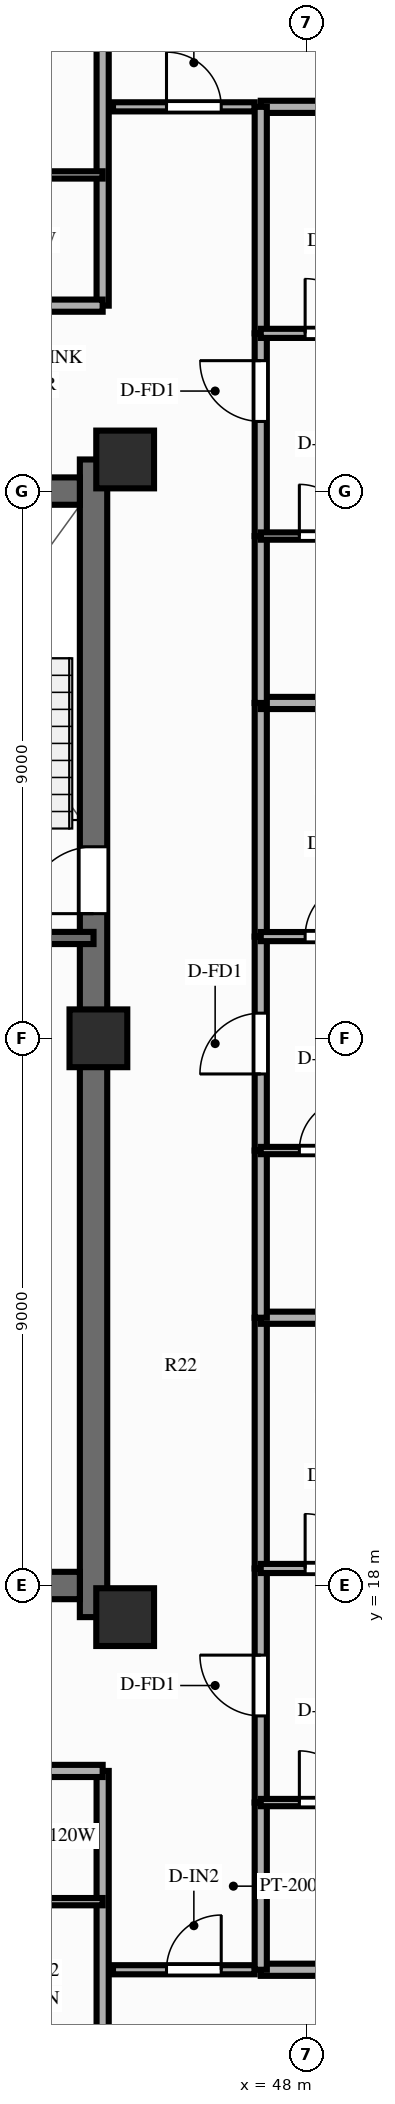
"""IFC4 building model, lengths in metres.
Left out: names, types, materials, properties, quantities, classifications, styles, units other than length and angle.
Written with IfcOpenShell. Run it as: python <this file> out.ifc"""

import sys

from ifc_helpers import new_model, si_unit, direction, frame, frame_2d, origin, origin_2d, place, context, subcontext, project, spatial, rectangle, extrude, source, transform, mapped, element, fill, save


model = new_model("IFC4")
c1 = context("Model", 3, precision=1e-05, world=origin(), true_north=direction((0.0, 1.0)))
c2 = subcontext(c1, "Body", "Model", "MODEL_VIEW")
j1 = project(units=[si_unit("LENGTHUNIT", "METRE"), si_unit("PLANEANGLEUNIT", "RADIAN")], contexts=[c1])
p1 = place(None, origin())
s1 = spatial("IfcSite", under=j1, at=p1, CompositionType="ELEMENT")
p2 = place(p1, origin())
s2 = spatial("IfcBuilding", under=s1, at=p2, CompositionType="ELEMENT")
p3 = place(p2, frame((0.0, 0.0, 226.2)))
s3 = spatial("IfcBuildingStorey", under=s2, at=p3, CompositionType="ELEMENT", Elevation=226.2)
p4 = place(p3, frame((44.5, 17.48, 0.0), z_axis=(0.0, 0.0, 1.0), x_axis=(0.0, 1.0, 0.0)))
e1 = element("IfcWall", 1, at=p4, inside=s3, PredefinedType="SHEAR", context=c2, shape_type="SweptSolid", body=[
    extrude(rectangle(XDim=19.04, YDim=0.45, at=frame_2d((9.52, 0.0))), origin(), (0.0, 0.0, 1.0), 3.9),
])
p5 = place(p4, frame((12.67, 0.0, 0.0), z_axis=(0.0, 0.0, 1.0), x_axis=(-1.0, 0.0, 0.0)))
e2 = element("IfcOpeningElement", 2, at=p5, cuts=e1, PredefinedType="OPENING", context=c2, shape_type="SweptSolid", body=[
    extrude(rectangle(XDim=1.1, YDim=2.15, at=frame_2d((0.55, 1.075))), frame((0.0, 0.237, 0.0), z_axis=(0.0, -1.0, 0.0), x_axis=(1.0, 0.0, 0.0)), (0.0, 0.0, 1.0), 0.474),
])
p6 = place(p3, frame((31.725, 18.0, 0.0), z_axis=(0.0, 0.0, 1.0), x_axis=(1.0, 0.0, 0.0)))
e3 = element("IfcWall", 3, at=p6, inside=s3, PredefinedType="SHEAR", context=c2, shape_type="SweptSolid", body=[
    extrude(rectangle(XDim=12.55, YDim=0.45, at=frame_2d((6.275, 0.0))), origin(), (0.0, 0.0, 1.0), 3.9),
])
p7 = place(p3, frame((31.725, 36.0, 0.0), z_axis=(0.0, 0.0, 1.0), x_axis=(1.0, 0.0, 0.0)))
e4 = element("IfcWall", 4, at=p7, inside=s3, PredefinedType="SHEAR", context=c2, shape_type="SweptSolid", body=[
    extrude(rectangle(XDim=12.55, YDim=0.45, at=frame_2d((6.275, 0.0))), origin(), (0.0, 0.0, 1.0), 3.9),
])
p8 = place(p7, frame((5.225, 0.0, 0.0), z_axis=(0.0, 0.0, 1.0), x_axis=(-1.0, 0.0, 0.0)))
e5 = element("IfcOpeningElement", 5, at=p8, cuts=e4, PredefinedType="OPENING", context=c2, shape_type="SweptSolid", body=[
    extrude(rectangle(XDim=1.4, YDim=2.15, at=frame_2d((0.7, 1.075))), frame((0.0, 0.237, 0.0), z_axis=(0.0, -1.0, 0.0), x_axis=(1.0, 0.0, 0.0)), (0.0, 0.0, 1.0), 0.474),
])
m1 = source(origin(), c2, "Body", "SweptSolid", [
    extrude(rectangle(XDim=0.95, YDim=0.95, at=origin_2d()), origin(), (0.0, 0.0, 1.0), 3.9),
])
for number, where, z_axis, x_axis in (
    (6, (45.02, 17.48, 0.0), (0.0, 0.0, 1.0), (1.0, 0.0, 0.0)),
    (7, (45.02, 36.52, 0.0), (0.0, 0.0, 1.0), (1.0, 0.0, 0.0)),
    (8, (44.58, 27.0, 0.0), (0.0, 0.0, 1.0), (1.0, 0.0, 0.0)),
):
    element("IfcColumn", number, at=place(p3, frame(where, z_axis=z_axis, x_axis=x_axis)), inside=s3, PredefinedType="COLUMN", context=c2, shape_type="MappedRepresentation", body=[
        mapped(m1, transform((0.0, 0.0, 0.0), scale=1.0)),
    ])
p9 = place(p3, frame((40.57, 28.65, 0.0), z_axis=(0.0, 0.0, 1.0), x_axis=(1.0, 0.0, 0.0)))
e9 = element("IfcWall", 9, at=p9, inside=s3, PredefinedType="SOLIDWALL", context=c2, shape_type="SweptSolid", body=[
    extrude(rectangle(XDim=3.93, YDim=0.2, at=frame_2d((1.965, 0.0))), origin(), (0.0, 0.0, 1.0), 3.69),
])
p10 = place(p3, frame((44.82, 11.68, 0.0), z_axis=(0.0, 0.0, 1.0), x_axis=(1.0, 0.0, 0.0)))
e10 = element("IfcWall", 10, at=p10, inside=s3, PredefinedType="PARTITIONING", context=c2, shape_type="SweptSolid", body=[
    extrude(rectangle(XDim=2.33, YDim=0.15, at=frame_2d((1.165, 0.0))), origin(), (0.0, 0.0, 1.0), 3.69),
])
p11 = place(p10, frame((0.88, 0.0, 0.0)))
e11 = element("IfcOpeningElement", 11, at=p11, cuts=e10, PredefinedType="OPENING", context=c2, shape_type="SweptSolid", body=[
    extrude(rectangle(XDim=0.9, YDim=2.1, at=frame_2d((0.45, 1.05))), frame((0.0, 0.087, 0.0), z_axis=(0.0, -1.0, 0.0), x_axis=(1.0, 0.0, 0.0)), (0.0, 0.0, 1.0), 0.174),
])
p12 = place(p3, frame((44.82, 42.32, 0.0), z_axis=(0.0, 0.0, 1.0), x_axis=(1.0, 0.0, 0.0)))
e12 = element("IfcWall", 12, at=p12, inside=s3, PredefinedType="PARTITIONING", context=c2, shape_type="SweptSolid", body=[
    extrude(rectangle(XDim=2.33, YDim=0.15, at=frame_2d((1.165, 0.0))), origin(), (0.0, 0.0, 1.0), 3.69),
])
p13 = place(p12, frame((0.88, 0.0, 0.0)))
e13 = element("IfcOpeningElement", 13, at=p13, cuts=e12, PredefinedType="OPENING", context=c2, shape_type="SweptSolid", body=[
    extrude(rectangle(XDim=0.9, YDim=2.1, at=frame_2d((0.45, 1.05))), frame((0.0, 0.087, 0.0), z_axis=(0.0, -1.0, 0.0), x_axis=(1.0, 0.0, 0.0)), (0.0, 0.0, 1.0), 0.174),
])
p14 = place(p3, frame((44.65, 14.95, 0.0), z_axis=(0.0, 0.0, 1.0), x_axis=(0.0, -1.0, 0.0)))
e14 = element("IfcWall", 14, at=p14, inside=s3, PredefinedType="PARTITIONING", context=c2, shape_type="SweptSolid", body=[
    extrude(rectangle(XDim=8.8, YDim=0.2, at=frame_2d((4.4, 0.0))), origin(), (0.0, 0.0, 1.0), 2.79),
])
p15 = place(p3, frame((41.8, 14.95, 0.0), z_axis=(0.0, 0.0, 1.0), x_axis=(1.0, 0.0, 0.0)))
e15 = element("IfcWall", 15, at=p15, inside=s3, PredefinedType="PARTITIONING", context=c2, shape_type="SweptSolid", body=[
    extrude(rectangle(XDim=2.85, YDim=0.2, at=frame_2d((1.425, 0.0))), origin(), (0.0, 0.0, 1.0), 3.69),
])
p16 = place(p3, frame((41.8, 12.8, 0.0), z_axis=(0.0, 0.0, 1.0), x_axis=(1.0, 0.0, 0.0)))
e16 = element("IfcWall", 16, at=p16, inside=s3, PredefinedType="PARTITIONING", context=c2, shape_type="SweptSolid", body=[
    extrude(rectangle(XDim=2.85, YDim=0.12, at=frame_2d((1.425, 0.0))), origin(), (0.0, 0.0, 1.0), 3.69),
])
p17 = place(p3, frame((44.65, 39.05, 0.0), z_axis=(0.0, 0.0, 1.0), x_axis=(0.0, 1.0, 0.0)))
e17 = element("IfcWall", 17, at=p17, inside=s3, PredefinedType="PARTITIONING", context=c2, shape_type="SweptSolid", body=[
    extrude(rectangle(XDim=8.8, YDim=0.2, at=frame_2d((4.4, 0.0))), origin(), (0.0, 0.0, 1.0), 2.79),
])
p18 = place(p3, frame((41.983, 39.05, 0.0), z_axis=(0.0, 0.0, 1.0), x_axis=(1.0, 0.0, 0.0)))
e18 = element("IfcWall", 18, at=p18, inside=s3, PredefinedType="PARTITIONING", context=c2, shape_type="SweptSolid", body=[
    extrude(rectangle(XDim=2.667, YDim=0.2, at=frame_2d((1.333, 0.0))), origin(), (0.0, 0.0, 1.0), 3.69),
])
p19 = place(p3, frame((41.983, 41.2, 0.0), z_axis=(0.0, 0.0, 1.0), x_axis=(1.0, 0.0, 0.0)))
e19 = element("IfcWall", 19, at=p19, inside=s3, PredefinedType="PARTITIONING", context=c2, shape_type="SweptSolid", body=[
    extrude(rectangle(XDim=2.667, YDim=0.12, at=frame_2d((1.333, 0.0))), origin(), (0.0, 0.0, 1.0), 3.69),
])
for number, where, z_axis, x_axis in (
    (20, (47.25, 11.68, 0.0), (0.0, 0.0, 1.0), (1.0, 0.0, 0.0)),
    (21, (47.25, 42.32, 0.0), (0.0, 0.0, 1.0), (1.0, 0.0, 0.0)),
):
    element("IfcWall", number, at=place(p3, frame(where, z_axis=z_axis, x_axis=x_axis)), inside=s3, PredefinedType="PARTITIONING", context=c2, shape_type="SweptSolid", body=[
        extrude(rectangle(XDim=7.35, YDim=0.2, at=frame_2d((3.675, 0.0))), origin(), (0.0, 0.0, 1.0), 3.69),
    ])
p20 = place(p3, frame((47.25, 11.68, 0.0), z_axis=(0.0, 0.0, 1.0), x_axis=(0.0, 1.0, 0.0)))
e22 = element("IfcWall", 22, at=p20, inside=s3, PredefinedType="PARTITIONING", context=c2, shape_type="SweptSolid", body=[
    extrude(rectangle(XDim=2.75, YDim=0.2, at=frame_2d((1.375, 0.0))), origin(), (0.0, 0.0, 1.0), 3.69),
])
p21 = place(p3, frame((47.25, 14.43, 0.0), z_axis=(0.0, 0.0, 1.0), x_axis=(0.0, 1.0, 0.0)))
e23 = element("IfcWall", 23, at=p21, inside=s3, PredefinedType="PARTITIONING", context=c2, shape_type="SweptSolid", body=[
    extrude(rectangle(XDim=3.85, YDim=0.2, at=frame_2d((1.925, 0.0))), origin(), (0.0, 0.0, 1.0), 3.69),
])
p22 = place(p21, frame((1.425, 0.0, 0.0)))
e24 = element("IfcOpeningElement", 24, at=p22, cuts=e23, PredefinedType="OPENING", context=c2, shape_type="SweptSolid", body=[
    extrude(rectangle(XDim=1.0, YDim=2.15, at=frame_2d((0.5, 1.075))), frame((0.0, 0.112, 0.0), z_axis=(0.0, -1.0, 0.0), x_axis=(1.0, 0.0, 0.0)), (0.0, 0.0, 1.0), 0.224),
])
p23 = place(p3, frame((47.25, 18.28, 0.0), z_axis=(0.0, 0.0, 1.0), x_axis=(0.0, 1.0, 0.0)))
e25 = element("IfcWall", 25, at=p23, inside=s3, PredefinedType="PARTITIONING", context=c2, shape_type="SweptSolid", body=[
    extrude(rectangle(XDim=4.124, YDim=0.2, at=frame_2d((2.062, 0.0))), origin(), (0.0, 0.0, 1.0), 3.69),
])
p24 = place(p3, frame((47.25, 14.43, 0.0), z_axis=(0.0, 0.0, 1.0), x_axis=(1.0, 0.0, 0.0)))
e26 = element("IfcWall", 26, at=p24, inside=s3, PredefinedType="PARTITIONING", context=c2, shape_type="SweptSolid", body=[
    extrude(rectangle(XDim=2.12, YDim=0.12, at=frame_2d((1.06, 0.0))), origin(), (0.0, 0.0, 1.0), 3.69),
])
p25 = place(p24, frame((0.635, 0.0, 0.0)))
e27 = element("IfcOpeningElement", 27, at=p25, cuts=e26, PredefinedType="OPENING", context=c2, shape_type="SweptSolid", body=[
    extrude(rectangle(XDim=0.85, YDim=2.05, at=frame_2d((0.425, 1.025))), frame((0.0, 0.072, 0.0), z_axis=(0.0, -1.0, 0.0), x_axis=(1.0, 0.0, 0.0)), (0.0, 0.0, 1.0), 0.144),
])
p26 = place(p3, frame((47.25, 18.28, 0.0), z_axis=(0.0, 0.0, 1.0), x_axis=(1.0, 0.0, 0.0)))
e28 = element("IfcWall", 28, at=p26, inside=s3, PredefinedType="PARTITIONING", context=c2, shape_type="SweptSolid", body=[
    extrude(rectangle(XDim=2.36, YDim=0.15, at=frame_2d((1.18, 0.0))), origin(), (0.0, 0.0, 1.0), 3.69),
])
p27 = place(p26, frame((0.73, 0.0, 0.0)))
e29 = element("IfcOpeningElement", 29, at=p27, cuts=e28, PredefinedType="OPENING", context=c2, shape_type="SweptSolid", body=[
    extrude(rectangle(XDim=0.9, YDim=2.1, at=frame_2d((0.45, 1.05))), frame((0.0, 0.087, 0.0), z_axis=(0.0, -1.0, 0.0), x_axis=(1.0, 0.0, 0.0)), (0.0, 0.0, 1.0), 0.174),
])
p28 = place(p3, frame((47.25, 22.404, 0.0), z_axis=(0.0, 0.0, 1.0), x_axis=(1.0, 0.0, 0.0)))
e30 = element("IfcWall", 30, at=p28, inside=s3, PredefinedType="PARTITIONING", context=c2, shape_type="SweptSolid", body=[
    extrude(rectangle(XDim=7.35, YDim=0.2, at=frame_2d((3.675, 0.0))), origin(), (0.0, 0.0, 1.0), 3.29),
])
p29 = place(p3, frame((47.25, 22.404, 0.0), z_axis=(0.0, 0.0, 1.0), x_axis=(0.0, 1.0, 0.0)))
e31 = element("IfcWall", 31, at=p29, inside=s3, PredefinedType="PARTITIONING", context=c2, shape_type="SweptSolid", body=[
    extrude(rectangle(XDim=2.75, YDim=0.2, at=frame_2d((1.375, 0.0))), origin(), (0.0, 0.0, 1.0), 3.69),
])
p30 = place(p3, frame((47.25, 25.154, 0.0), z_axis=(0.0, 0.0, 1.0), x_axis=(0.0, 1.0, 0.0)))
e32 = element("IfcWall", 32, at=p30, inside=s3, PredefinedType="PARTITIONING", context=c2, shape_type="SweptSolid", body=[
    extrude(rectangle(XDim=3.519, YDim=0.2, at=frame_2d((1.759, 0.0))), origin(), (0.0, 0.0, 1.0), 3.69),
])
p31 = place(p30, frame((1.26, 0.0, 0.0)))
e33 = element("IfcOpeningElement", 33, at=p31, cuts=e32, PredefinedType="OPENING", context=c2, shape_type="SweptSolid", body=[
    extrude(rectangle(XDim=1.0, YDim=2.15, at=frame_2d((0.5, 1.075))), frame((0.0, 0.112, 0.0), z_axis=(0.0, -1.0, 0.0), x_axis=(1.0, 0.0, 0.0)), (0.0, 0.0, 1.0), 0.224),
])
p32 = place(p3, frame((47.25, 28.673, 0.0), z_axis=(0.0, 0.0, 1.0), x_axis=(0.0, 1.0, 0.0)))
e34 = element("IfcWall", 34, at=p32, inside=s3, PredefinedType="PARTITIONING", context=c2, shape_type="SweptSolid", body=[
    extrude(rectangle(XDim=3.842, YDim=0.2, at=frame_2d((1.921, 0.0))), origin(), (0.0, 0.0, 1.0), 3.69),
])
p33 = place(p3, frame((47.25, 25.154, 0.0), z_axis=(0.0, 0.0, 1.0), x_axis=(1.0, 0.0, 0.0)))
e35 = element("IfcWall", 35, at=p33, inside=s3, PredefinedType="PARTITIONING", context=c2, shape_type="SweptSolid", body=[
    extrude(rectangle(XDim=2.12, YDim=0.12, at=frame_2d((1.06, 0.0))), origin(), (0.0, 0.0, 1.0), 3.69),
])
p34 = place(p33, frame((0.635, 0.0, 0.0)))
e36 = element("IfcOpeningElement", 36, at=p34, cuts=e35, PredefinedType="OPENING", context=c2, shape_type="SweptSolid", body=[
    extrude(rectangle(XDim=0.85, YDim=2.05, at=frame_2d((0.425, 1.025))), frame((0.0, 0.072, 0.0), z_axis=(0.0, -1.0, 0.0), x_axis=(1.0, 0.0, 0.0)), (0.0, 0.0, 1.0), 0.144),
])
p35 = place(p3, frame((47.25, 28.673, 0.0), z_axis=(0.0, 0.0, 1.0), x_axis=(1.0, 0.0, 0.0)))
e37 = element("IfcWall", 37, at=p35, inside=s3, PredefinedType="PARTITIONING", context=c2, shape_type="SweptSolid", body=[
    extrude(rectangle(XDim=2.36, YDim=0.15, at=frame_2d((1.18, 0.0))), origin(), (0.0, 0.0, 1.0), 3.69),
])
p36 = place(p35, frame((0.73, 0.0, 0.0)))
e38 = element("IfcOpeningElement", 38, at=p36, cuts=e37, PredefinedType="OPENING", context=c2, shape_type="SweptSolid", body=[
    extrude(rectangle(XDim=0.9, YDim=2.1, at=frame_2d((0.45, 1.05))), frame((0.0, 0.087, 0.0), z_axis=(0.0, -1.0, 0.0), x_axis=(1.0, 0.0, 0.0)), (0.0, 0.0, 1.0), 0.174),
])
p37 = place(p3, frame((47.25, 32.515, 0.0), z_axis=(0.0, 0.0, 1.0), x_axis=(1.0, 0.0, 0.0)))
e39 = element("IfcWall", 39, at=p37, inside=s3, PredefinedType="PARTITIONING", context=c2, shape_type="SweptSolid", body=[
    extrude(rectangle(XDim=7.35, YDim=0.2, at=frame_2d((3.675, 0.0))), origin(), (0.0, 0.0, 1.0), 3.29),
])
p38 = place(p3, frame((47.25, 32.515, 0.0), z_axis=(0.0, 0.0, 1.0), x_axis=(0.0, 1.0, 0.0)))
e40 = element("IfcWall", 40, at=p38, inside=s3, PredefinedType="PARTITIONING", context=c2, shape_type="SweptSolid", body=[
    extrude(rectangle(XDim=2.745, YDim=0.2, at=frame_2d((1.373, 0.0))), origin(), (0.0, 0.0, 1.0), 3.69),
])
p39 = place(p3, frame((47.25, 35.26, 0.0), z_axis=(0.0, 0.0, 1.0), x_axis=(0.0, 1.0, 0.0)))
e41 = element("IfcWall", 41, at=p39, inside=s3, PredefinedType="PARTITIONING", context=c2, shape_type="SweptSolid", body=[
    extrude(rectangle(XDim=3.334, YDim=0.2, at=frame_2d((1.667, 0.0))), origin(), (0.0, 0.0, 1.0), 3.69),
])
p40 = place(p39, frame((1.885, 0.0, 0.0)))
e42 = element("IfcOpeningElement", 42, at=p40, cuts=e41, PredefinedType="OPENING", context=c2, shape_type="SweptSolid", body=[
    extrude(rectangle(XDim=1.0, YDim=2.15, at=frame_2d((0.5, 1.075))), frame((0.0, 0.112, 0.0), z_axis=(0.0, -1.0, 0.0), x_axis=(1.0, 0.0, 0.0)), (0.0, 0.0, 1.0), 0.224),
])
p41 = place(p3, frame((47.25, 38.594, 0.0), z_axis=(0.0, 0.0, 1.0), x_axis=(0.0, 1.0, 0.0)))
e43 = element("IfcWall", 43, at=p41, inside=s3, PredefinedType="PARTITIONING", context=c2, shape_type="SweptSolid", body=[
    extrude(rectangle(XDim=3.726, YDim=0.2, at=frame_2d((1.863, 0.0))), origin(), (0.0, 0.0, 1.0), 3.69),
])
p42 = place(p3, frame((47.25, 35.26, 0.0), z_axis=(0.0, 0.0, 1.0), x_axis=(1.0, 0.0, 0.0)))
e44 = element("IfcWall", 44, at=p42, inside=s3, PredefinedType="PARTITIONING", context=c2, shape_type="SweptSolid", body=[
    extrude(rectangle(XDim=2.12, YDim=0.12, at=frame_2d((1.06, 0.0))), origin(), (0.0, 0.0, 1.0), 3.69),
])
p43 = place(p42, frame((0.635, 0.0, 0.0)))
e45 = element("IfcOpeningElement", 45, at=p43, cuts=e44, PredefinedType="OPENING", context=c2, shape_type="SweptSolid", body=[
    extrude(rectangle(XDim=0.85, YDim=2.05, at=frame_2d((0.425, 1.025))), frame((0.0, 0.072, 0.0), z_axis=(0.0, -1.0, 0.0), x_axis=(1.0, 0.0, 0.0)), (0.0, 0.0, 1.0), 0.144),
])
p44 = place(p3, frame((47.25, 38.594, 0.0), z_axis=(0.0, 0.0, 1.0), x_axis=(1.0, 0.0, 0.0)))
e46 = element("IfcWall", 46, at=p44, inside=s3, PredefinedType="PARTITIONING", context=c2, shape_type="SweptSolid", body=[
    extrude(rectangle(XDim=2.36, YDim=0.15, at=frame_2d((1.18, 0.0))), origin(), (0.0, 0.0, 1.0), 3.69),
])
p45 = place(p44, frame((0.73, 0.0, 0.0)))
e47 = element("IfcOpeningElement", 47, at=p45, cuts=e46, PredefinedType="OPENING", context=c2, shape_type="SweptSolid", body=[
    extrude(rectangle(XDim=0.9, YDim=2.1, at=frame_2d((0.45, 1.05))), frame((0.0, 0.087, 0.0), z_axis=(0.0, -1.0, 0.0), x_axis=(1.0, 0.0, 0.0)), (0.0, 0.0, 1.0), 0.174),
])
m2 = source(origin(), c2, "Body", "SweptSolid", [
    extrude(rectangle(XDim=1.1, YDim=2.15, at=frame_2d((0.55, 1.075))), frame((0.0, 0.025, 0.0), z_axis=(0.0, -1.0, 0.0), x_axis=(1.0, 0.0, 0.0)), (0.0, 0.0, 1.0), 0.05),
])
p46 = place(p5, origin())
e48 = element("IfcDoor", 48, at=p46, inside=s3, OperationType="SINGLE_SWING_RIGHT", PredefinedType="DOOR", context=c2, shape_type="MappedRepresentation", body=[
    mapped(m2, transform((0.0, 0.0, 0.0), scale=1.0)),
])
fill(e2, e48)
m3 = source(origin(), c2, "Body", "SweptSolid", [
    extrude(rectangle(XDim=0.9, YDim=2.1, at=frame_2d((0.45, 1.05))), frame((0.0, 0.025, 0.0), z_axis=(0.0, -1.0, 0.0), x_axis=(1.0, 0.0, 0.0)), (0.0, 0.0, 1.0), 0.05),
])
p47 = place(p11, origin())
e49 = element("IfcDoor", 49, at=p47, inside=s3, OperationType="SINGLE_SWING_RIGHT", PredefinedType="DOOR", context=c2, shape_type="MappedRepresentation", body=[
    mapped(m3, transform((0.0, 0.0, 0.0), scale=1.0)),
])
fill(e11, e49)
p48 = place(p13, origin())
e50 = element("IfcDoor", 50, at=p48, inside=s3, OperationType="SINGLE_SWING_LEFT", PredefinedType="DOOR", context=c2, shape_type="MappedRepresentation", body=[
    mapped(m3, transform((0.0, 0.0, 0.0), scale=1.0)),
])
fill(e13, e50)
m4 = source(origin(), c2, "Body", "SweptSolid", [
    extrude(rectangle(XDim=1.0, YDim=2.15, at=frame_2d((0.5, 1.075))), frame((0.0, 0.025, 0.0), z_axis=(0.0, -1.0, 0.0), x_axis=(1.0, 0.0, 0.0)), (0.0, 0.0, 1.0), 0.05),
])
p49 = place(p22, origin())
e51 = element("IfcDoor", 51, at=p49, inside=s3, OperationType="SINGLE_SWING_RIGHT", PredefinedType="DOOR", context=c2, shape_type="MappedRepresentation", body=[
    mapped(m4, transform((0.0, 0.0, 0.0), scale=1.0)),
])
fill(e24, e51)
m5 = source(origin(), c2, "Body", "SweptSolid", [
    extrude(rectangle(XDim=0.85, YDim=2.05, at=frame_2d((0.425, 1.025))), frame((0.0, 0.025, 0.0), z_axis=(0.0, -1.0, 0.0), x_axis=(1.0, 0.0, 0.0)), (0.0, 0.0, 1.0), 0.05),
])
p50 = place(p25, origin())
e52 = element("IfcDoor", 52, at=p50, inside=s3, OperationType="SINGLE_SWING_LEFT", PredefinedType="DOOR", context=c2, shape_type="MappedRepresentation", body=[
    mapped(m5, transform((0.0, 0.0, 0.0), scale=1.0)),
])
fill(e27, e52)
p51 = place(p27, origin())
e53 = element("IfcDoor", 53, at=p51, inside=s3, OperationType="SINGLE_SWING_LEFT", PredefinedType="DOOR", context=c2, shape_type="MappedRepresentation", body=[
    mapped(m3, transform((0.0, 0.0, 0.0), scale=1.0)),
])
fill(e29, e53)
p52 = place(p31, origin())
e54 = element("IfcDoor", 54, at=p52, inside=s3, OperationType="SINGLE_SWING_LEFT", PredefinedType="DOOR", context=c2, shape_type="MappedRepresentation", body=[
    mapped(m4, transform((0.0, 0.0, 0.0), scale=1.0)),
])
fill(e33, e54)
p53 = place(p34, origin())
e55 = element("IfcDoor", 55, at=p53, inside=s3, OperationType="SINGLE_SWING_RIGHT", PredefinedType="DOOR", context=c2, shape_type="MappedRepresentation", body=[
    mapped(m5, transform((0.0, 0.0, 0.0), scale=1.0)),
])
fill(e36, e55)
p54 = place(p36, origin())
e56 = element("IfcDoor", 56, at=p54, inside=s3, OperationType="SINGLE_SWING_RIGHT", PredefinedType="DOOR", context=c2, shape_type="MappedRepresentation", body=[
    mapped(m3, transform((0.0, 0.0, 0.0), scale=1.0)),
])
fill(e38, e56)
p55 = place(p40, origin())
e57 = element("IfcDoor", 57, at=p55, inside=s3, OperationType="SINGLE_SWING_RIGHT", PredefinedType="DOOR", context=c2, shape_type="MappedRepresentation", body=[
    mapped(m4, transform((0.0, 0.0, 0.0), scale=1.0)),
])
fill(e42, e57)
p56 = place(p43, origin())
e58 = element("IfcDoor", 58, at=p56, inside=s3, OperationType="SINGLE_SWING_LEFT", PredefinedType="DOOR", context=c2, shape_type="MappedRepresentation", body=[
    mapped(m5, transform((0.0, 0.0, 0.0), scale=1.0)),
])
fill(e45, e58)
p57 = place(p45, origin())
e59 = element("IfcDoor", 59, at=p57, inside=s3, OperationType="SINGLE_SWING_LEFT", PredefinedType="DOOR", context=c2, shape_type="MappedRepresentation", body=[
    mapped(m3, transform((0.0, 0.0, 0.0), scale=1.0)),
])
fill(e47, e59)
save(model, sys.argv[1])
